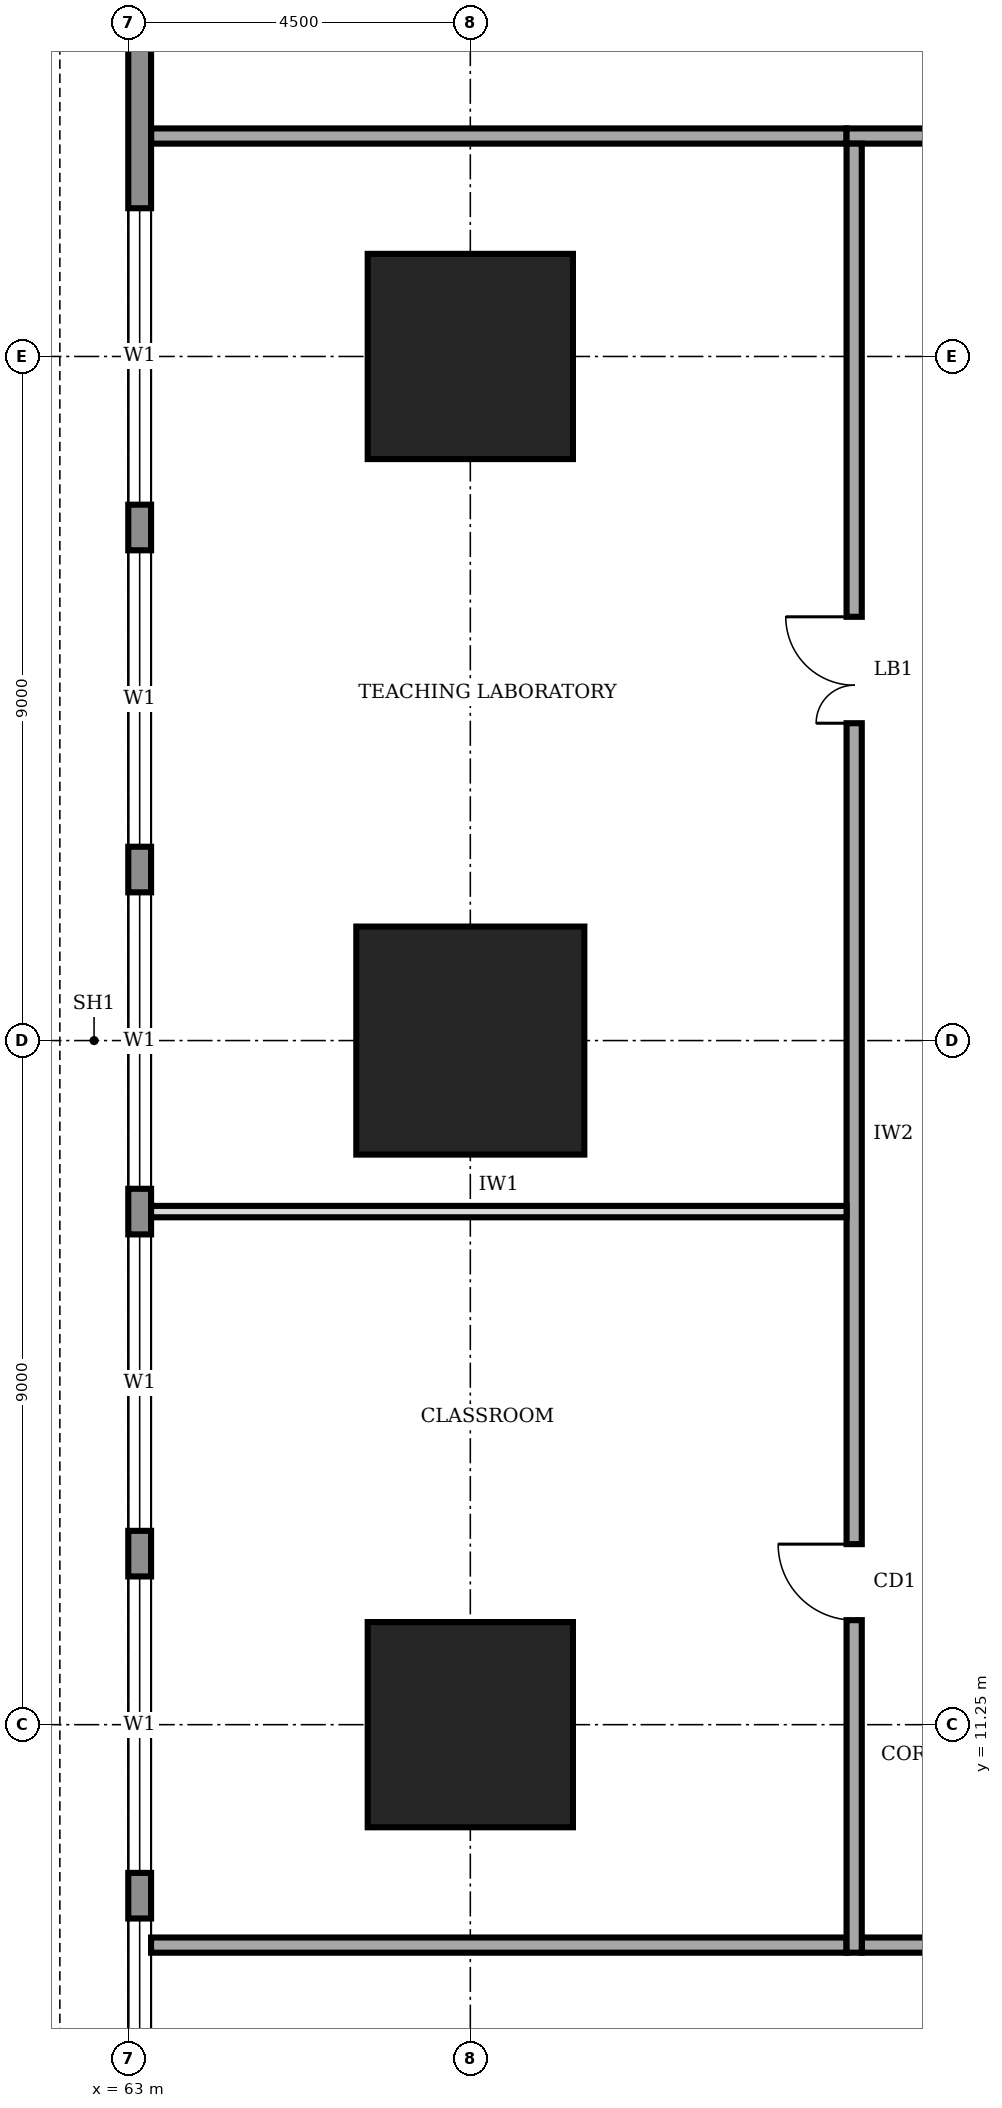
"""IFC4 building model, lengths in metres.
Left out: names, types, materials, properties, quantities, classifications, styles, units other than length and angle.
Written with IfcOpenShell. Run it as: python <this file> out.ifc"""

import sys

from ifc_helpers import new_model, si_unit, direction, frame, frame_2d, origin, origin_2d, place, context, subcontext, project, spatial, rectangle, extrude, element, fill, save


model = new_model("IFC4")
c1 = context("Model", 3, precision=1e-05, world=origin(), true_north=direction((0.0, 1.0)))
c2 = subcontext(c1, "Body", "Model", "MODEL_VIEW")
j1 = project(units=[si_unit("LENGTHUNIT", "METRE"), si_unit("PLANEANGLEUNIT", "RADIAN")], contexts=[c1])
p1 = place(None, origin())
s1 = spatial("IfcSite", under=j1, at=p1, CompositionType="ELEMENT")
p2 = place(p1, origin())
s2 = spatial("IfcBuilding", under=s1, at=p2, CompositionType="ELEMENT")
p3 = place(p2, frame((0.0, 0.0, 37.0)))
s3 = spatial("IfcBuildingStorey", under=s2, at=p3, CompositionType="ELEMENT", Elevation=37.0)
p4 = place(p3, frame((67.5, 11.25, 0.0), z_axis=(0.0, 0.0, 1.0), x_axis=(1.0, 0.0, 0.0)))
e1 = element("IfcColumn", 1, at=p4, inside=s3, PredefinedType="COLUMN", context=c2, shape_type="SweptSolid", body=[
    extrude(rectangle(XDim=2.7, YDim=2.7, at=origin_2d()), origin(), (0.0, 0.0, 1.0), 4.0),
])
p5 = place(p3, frame((67.5, 20.25, 0.0), z_axis=(0.0, 0.0, 1.0), x_axis=(1.0, 0.0, 0.0)))
e2 = element("IfcColumn", 2, at=p5, inside=s3, PredefinedType="COLUMN", context=c2, shape_type="SweptSolid", body=[
    extrude(rectangle(XDim=3.0, YDim=3.0, at=origin_2d()), origin(), (0.0, 0.0, 1.0), 4.0),
])
p6 = place(p3, frame((67.5, 29.25, 0.0), z_axis=(0.0, 0.0, 1.0), x_axis=(1.0, 0.0, 0.0)))
e3 = element("IfcColumn", 3, at=p6, inside=s3, PredefinedType="COLUMN", context=c2, shape_type="SweptSolid", body=[
    extrude(rectangle(XDim=2.7, YDim=2.7, at=origin_2d()), origin(), (0.0, 0.0, 1.0), 4.0),
])
p7 = place(p3, frame((63.15, 35.98, 0.0), z_axis=(0.0, 0.0, 1.0), x_axis=(0.0, -1.0, 0.0)))
e4 = element("IfcWall", 4, at=p7, inside=s3, PredefinedType="STANDARD", context=c2, shape_type="SweptSolid", body=[
    extrude(rectangle(XDim=31.46, YDim=0.3, at=frame_2d((15.73, 0.0))), origin(), (0.0, 0.0, 1.0), 3.75),
])
p8 = place(p7, frame((27.28, 0.0, 0.9)))
e5 = element("IfcOpeningElement", 5, at=p8, cuts=e4, PredefinedType="OPENING", context=c2, shape_type="SweptSolid", body=[
    extrude(rectangle(XDim=3.9, YDim=2.2, at=frame_2d((1.95, 1.1))), frame((0.0, 0.16, 0.0), z_axis=(0.0, -1.0, 0.0), x_axis=(1.0, 0.0, 0.0)), (0.0, 0.0, 1.0), 0.32),
])
p9 = place(p7, frame((22.78, 0.0, 0.9)))
e6 = element("IfcOpeningElement", 6, at=p9, cuts=e4, PredefinedType="OPENING", context=c2, shape_type="SweptSolid", body=[
    extrude(rectangle(XDim=3.9, YDim=2.2, at=frame_2d((1.95, 1.1))), frame((0.0, 0.16, 0.0), z_axis=(0.0, -1.0, 0.0), x_axis=(1.0, 0.0, 0.0)), (0.0, 0.0, 1.0), 0.32),
])
p10 = place(p7, frame((18.28, 0.0, 0.9)))
e7 = element("IfcOpeningElement", 7, at=p10, cuts=e4, PredefinedType="OPENING", context=c2, shape_type="SweptSolid", body=[
    extrude(rectangle(XDim=3.9, YDim=2.2, at=frame_2d((1.95, 1.1))), frame((0.0, 0.16, 0.0), z_axis=(0.0, -1.0, 0.0), x_axis=(1.0, 0.0, 0.0)), (0.0, 0.0, 1.0), 0.32),
])
p11 = place(p7, frame((13.78, 0.0, 0.9)))
e8 = element("IfcOpeningElement", 8, at=p11, cuts=e4, PredefinedType="OPENING", context=c2, shape_type="SweptSolid", body=[
    extrude(rectangle(XDim=3.9, YDim=2.2, at=frame_2d((1.95, 1.1))), frame((0.0, 0.16, 0.0), z_axis=(0.0, -1.0, 0.0), x_axis=(1.0, 0.0, 0.0)), (0.0, 0.0, 1.0), 0.32),
])
p12 = place(p7, frame((9.28, 0.0, 0.9)))
e9 = element("IfcOpeningElement", 9, at=p12, cuts=e4, PredefinedType="OPENING", context=c2, shape_type="SweptSolid", body=[
    extrude(rectangle(XDim=3.9, YDim=2.2, at=frame_2d((1.95, 1.1))), frame((0.0, 0.16, 0.0), z_axis=(0.0, -1.0, 0.0), x_axis=(1.0, 0.0, 0.0)), (0.0, 0.0, 1.0), 0.32),
])
p13 = place(p7, frame((4.78, 0.0, 0.9)))
e10 = element("IfcOpeningElement", 10, at=p13, cuts=e4, PredefinedType="OPENING", context=c2, shape_type="SweptSolid", body=[
    extrude(rectangle(XDim=3.9, YDim=2.2, at=frame_2d((1.95, 1.1))), frame((0.0, 0.16, 0.0), z_axis=(0.0, -1.0, 0.0), x_axis=(1.0, 0.0, 0.0)), (0.0, 0.0, 1.0), 0.32),
])
p14 = place(p3, frame((72.65, 8.35, 0.0), z_axis=(0.0, 0.0, 1.0), x_axis=(1.0, 0.0, 0.0)))
e11 = element("IfcWall", 11, at=p14, inside=s3, PredefinedType="SOLIDWALL", context=c2, shape_type="SweptSolid", body=[
    extrude(rectangle(XDim=16.9, YDim=0.2, at=frame_2d((8.45, 0.0))), origin(), (0.0, 0.0, 1.0), 3.75),
])
p15 = place(p14, frame((1.325, 0.0, 0.0)))
e12 = element("IfcOpeningElement", 12, at=p15, cuts=e11, PredefinedType="OPENING", context=c2, shape_type="SweptSolid", body=[
    extrude(rectangle(XDim=1.0, YDim=2.1, at=frame_2d((0.5, 1.05))), frame((0.0, 0.11, 0.0), z_axis=(0.0, -1.0, 0.0), x_axis=(1.0, 0.0, 0.0)), (0.0, 0.0, 1.0), 0.22),
])
p16 = place(p14, frame((5.6, 0.0, 0.0)))
e13 = element("IfcOpeningElement", 13, at=p16, cuts=e11, PredefinedType="OPENING", context=c2, shape_type="SweptSolid", body=[
    extrude(rectangle(XDim=1.0, YDim=2.1, at=frame_2d((0.5, 1.05))), frame((0.0, 0.11, 0.0), z_axis=(0.0, -1.0, 0.0), x_axis=(1.0, 0.0, 0.0)), (0.0, 0.0, 1.0), 0.22),
])
p17 = place(p14, frame((11.925, 0.0, 0.0)))
e14 = element("IfcOpeningElement", 14, at=p17, cuts=e11, PredefinedType="OPENING", context=c2, shape_type="SweptSolid", body=[
    extrude(rectangle(XDim=1.4, YDim=2.1, at=frame_2d((0.7, 1.05))), frame((0.0, 0.11, 0.0), z_axis=(0.0, -1.0, 0.0), x_axis=(1.0, 0.0, 0.0)), (0.0, 0.0, 1.0), 0.22),
])
p18 = place(p3, frame((89.35, 32.15, 0.0), z_axis=(0.0, 0.0, 1.0), x_axis=(-1.0, 0.0, 0.0)))
e15 = element("IfcWall", 15, at=p18, inside=s3, PredefinedType="SOLIDWALL", context=c2, shape_type="SweptSolid", body=[
    extrude(rectangle(XDim=16.9, YDim=0.2, at=frame_2d((8.45, 0.0))), origin(), (0.0, 0.0, 1.0), 3.75),
])
p19 = place(p18, frame((14.375, 0.0, 0.0)))
e16 = element("IfcOpeningElement", 16, at=p19, cuts=e15, PredefinedType="OPENING", context=c2, shape_type="SweptSolid", body=[
    extrude(rectangle(XDim=1.0, YDim=2.1, at=frame_2d((0.5, 1.05))), frame((0.0, 0.11, 0.0), z_axis=(0.0, -1.0, 0.0), x_axis=(1.0, 0.0, 0.0)), (0.0, 0.0, 1.0), 0.22),
])
p20 = place(p18, frame((7.85, 0.0, 0.0)))
e17 = element("IfcOpeningElement", 17, at=p20, cuts=e15, PredefinedType="OPENING", context=c2, shape_type="SweptSolid", body=[
    extrude(rectangle(XDim=1.0, YDim=2.1, at=frame_2d((0.5, 1.05))), frame((0.0, 0.11, 0.0), z_axis=(0.0, -1.0, 0.0), x_axis=(1.0, 0.0, 0.0)), (0.0, 0.0, 1.0), 0.22),
])
p21 = place(p18, frame((1.325, 0.0, 0.0)))
e18 = element("IfcOpeningElement", 18, at=p21, cuts=e15, PredefinedType="OPENING", context=c2, shape_type="SweptSolid", body=[
    extrude(rectangle(XDim=1.0, YDim=2.1, at=frame_2d((0.5, 1.05))), frame((0.0, 0.11, 0.0), z_axis=(0.0, -1.0, 0.0), x_axis=(1.0, 0.0, 0.0)), (0.0, 0.0, 1.0), 0.22),
])
p22 = place(p3, frame((72.55, 32.05, 0.0), z_axis=(0.0, 0.0, 1.0), x_axis=(0.0, -1.0, 0.0)))
e19 = element("IfcWall", 19, at=p22, inside=s3, PredefinedType="SOLIDWALL", context=c2, shape_type="SweptSolid", body=[
    extrude(rectangle(XDim=23.8, YDim=0.2, at=frame_2d((11.9, 0.0))), origin(), (0.0, 0.0, 1.0), 3.75),
])
p23 = place(p22, frame((18.425, 0.0, 0.0)))
e20 = element("IfcOpeningElement", 20, at=p23, cuts=e19, PredefinedType="OPENING", context=c2, shape_type="SweptSolid", body=[
    extrude(rectangle(XDim=1.0, YDim=2.1, at=frame_2d((0.5, 1.05))), frame((0.0, 0.11, 0.0), z_axis=(0.0, -1.0, 0.0), x_axis=(1.0, 0.0, 0.0)), (0.0, 0.0, 1.0), 0.22),
])
p24 = place(p22, frame((6.225, 0.0, 0.0)))
e21 = element("IfcOpeningElement", 21, at=p24, cuts=e19, PredefinedType="OPENING", context=c2, shape_type="SweptSolid", body=[
    extrude(rectangle(XDim=1.4, YDim=2.1, at=frame_2d((0.7, 1.05))), frame((0.0, 0.11, 0.0), z_axis=(0.0, -1.0, 0.0), x_axis=(1.0, 0.0, 0.0)), (0.0, 0.0, 1.0), 0.22),
])
for number, where, z_axis, x_axis in (
    (22, (63.3, 8.35, 0.0), (0.0, 0.0, 1.0), (1.0, 0.0, 0.0)),
    (23, (63.3, 32.15, 0.0), (0.0, 0.0, 1.0), (1.0, 0.0, 0.0)),
):
    element("IfcWall", number, at=place(p3, frame(where, z_axis=z_axis, x_axis=x_axis)), inside=s3, PredefinedType="SOLIDWALL", context=c2, shape_type="SweptSolid", body=[
        extrude(rectangle(XDim=9.15, YDim=0.2, at=frame_2d((4.575, 0.0))), origin(), (0.0, 0.0, 1.0), 3.75),
    ])
p25 = place(p3, frame((63.3, 18.0, 0.0), z_axis=(0.0, 0.0, 1.0), x_axis=(1.0, 0.0, 0.0)))
e24 = element("IfcWall", 24, at=p25, inside=s3, PredefinedType="PARTITIONING", context=c2, shape_type="SweptSolid", body=[
    extrude(rectangle(XDim=9.15, YDim=0.15, at=frame_2d((4.575, 0.0))), origin(), (0.0, 0.0, 1.0), 3.75),
])
p26 = place(p8, origin())
e25 = element("IfcWindow", 25, at=p26, inside=s3, PartitioningType="SINGLE_PANEL", PredefinedType="WINDOW", context=c2, shape_type="SweptSolid", body=[
    extrude(rectangle(XDim=3.9, YDim=2.2, at=frame_2d((1.95, 1.1))), frame((0.0, 0.03, 0.0), z_axis=(0.0, -1.0, 0.0), x_axis=(1.0, 0.0, 0.0)), (0.0, 0.0, 1.0), 0.06),
])
fill(e5, e25)
p27 = place(p9, origin())
e26 = element("IfcWindow", 26, at=p27, inside=s3, PartitioningType="SINGLE_PANEL", PredefinedType="WINDOW", context=c2, shape_type="SweptSolid", body=[
    extrude(rectangle(XDim=3.9, YDim=2.2, at=frame_2d((1.95, 1.1))), frame((0.0, 0.03, 0.0), z_axis=(0.0, -1.0, 0.0), x_axis=(1.0, 0.0, 0.0)), (0.0, 0.0, 1.0), 0.06),
])
fill(e6, e26)
p28 = place(p10, origin())
e27 = element("IfcWindow", 27, at=p28, inside=s3, PartitioningType="SINGLE_PANEL", PredefinedType="WINDOW", context=c2, shape_type="SweptSolid", body=[
    extrude(rectangle(XDim=3.9, YDim=2.2, at=frame_2d((1.95, 1.1))), frame((0.0, 0.03, 0.0), z_axis=(0.0, -1.0, 0.0), x_axis=(1.0, 0.0, 0.0)), (0.0, 0.0, 1.0), 0.06),
])
fill(e7, e27)
p29 = place(p11, origin())
e28 = element("IfcWindow", 28, at=p29, inside=s3, PartitioningType="SINGLE_PANEL", PredefinedType="WINDOW", context=c2, shape_type="SweptSolid", body=[
    extrude(rectangle(XDim=3.9, YDim=2.2, at=frame_2d((1.95, 1.1))), frame((0.0, 0.03, 0.0), z_axis=(0.0, -1.0, 0.0), x_axis=(1.0, 0.0, 0.0)), (0.0, 0.0, 1.0), 0.06),
])
fill(e8, e28)
p30 = place(p12, origin())
e29 = element("IfcWindow", 29, at=p30, inside=s3, PartitioningType="SINGLE_PANEL", PredefinedType="WINDOW", context=c2, shape_type="SweptSolid", body=[
    extrude(rectangle(XDim=3.9, YDim=2.2, at=frame_2d((1.95, 1.1))), frame((0.0, 0.03, 0.0), z_axis=(0.0, -1.0, 0.0), x_axis=(1.0, 0.0, 0.0)), (0.0, 0.0, 1.0), 0.06),
])
fill(e9, e29)
p31 = place(p13, origin())
e30 = element("IfcWindow", 30, at=p31, inside=s3, PartitioningType="SINGLE_PANEL", PredefinedType="WINDOW", context=c2, shape_type="SweptSolid", body=[
    extrude(rectangle(XDim=3.9, YDim=2.2, at=frame_2d((1.95, 1.1))), frame((0.0, 0.03, 0.0), z_axis=(0.0, -1.0, 0.0), x_axis=(1.0, 0.0, 0.0)), (0.0, 0.0, 1.0), 0.06),
])
fill(e10, e30)
p32 = place(p23, frame((1.0, 0.0, 0.0), z_axis=(0.0, 0.0, 1.0), x_axis=(-1.0, 0.0, 0.0)))
e31 = element("IfcDoor", 31, at=p32, inside=s3, OperationType="SINGLE_SWING_RIGHT", PredefinedType="DOOR", context=c2, shape_type="SweptSolid", body=[
    extrude(rectangle(XDim=1.0, YDim=2.1, at=frame_2d((0.5, 1.05))), frame((0.0, 0.025, 0.0), z_axis=(0.0, -1.0, 0.0), x_axis=(1.0, 0.0, 0.0)), (0.0, 0.0, 1.0), 0.05),
])
fill(e20, e31)
p33 = place(p24, frame((1.4, 0.0, 0.0), z_axis=(0.0, 0.0, 1.0), x_axis=(-1.0, 0.0, 0.0)))
e32 = element("IfcDoor", 32, at=p33, inside=s3, OperationType="DOUBLE_DOOR_SINGLE_SWING", PredefinedType="DOOR", context=c2, shape_type="SweptSolid", body=[
    extrude(rectangle(XDim=1.4, YDim=2.1, at=frame_2d((0.7, 1.05))), frame((0.0, 0.025, 0.0), z_axis=(0.0, -1.0, 0.0), x_axis=(1.0, 0.0, 0.0)), (0.0, 0.0, 1.0), 0.05),
])
fill(e21, e32)
save(model, sys.argv[1])
